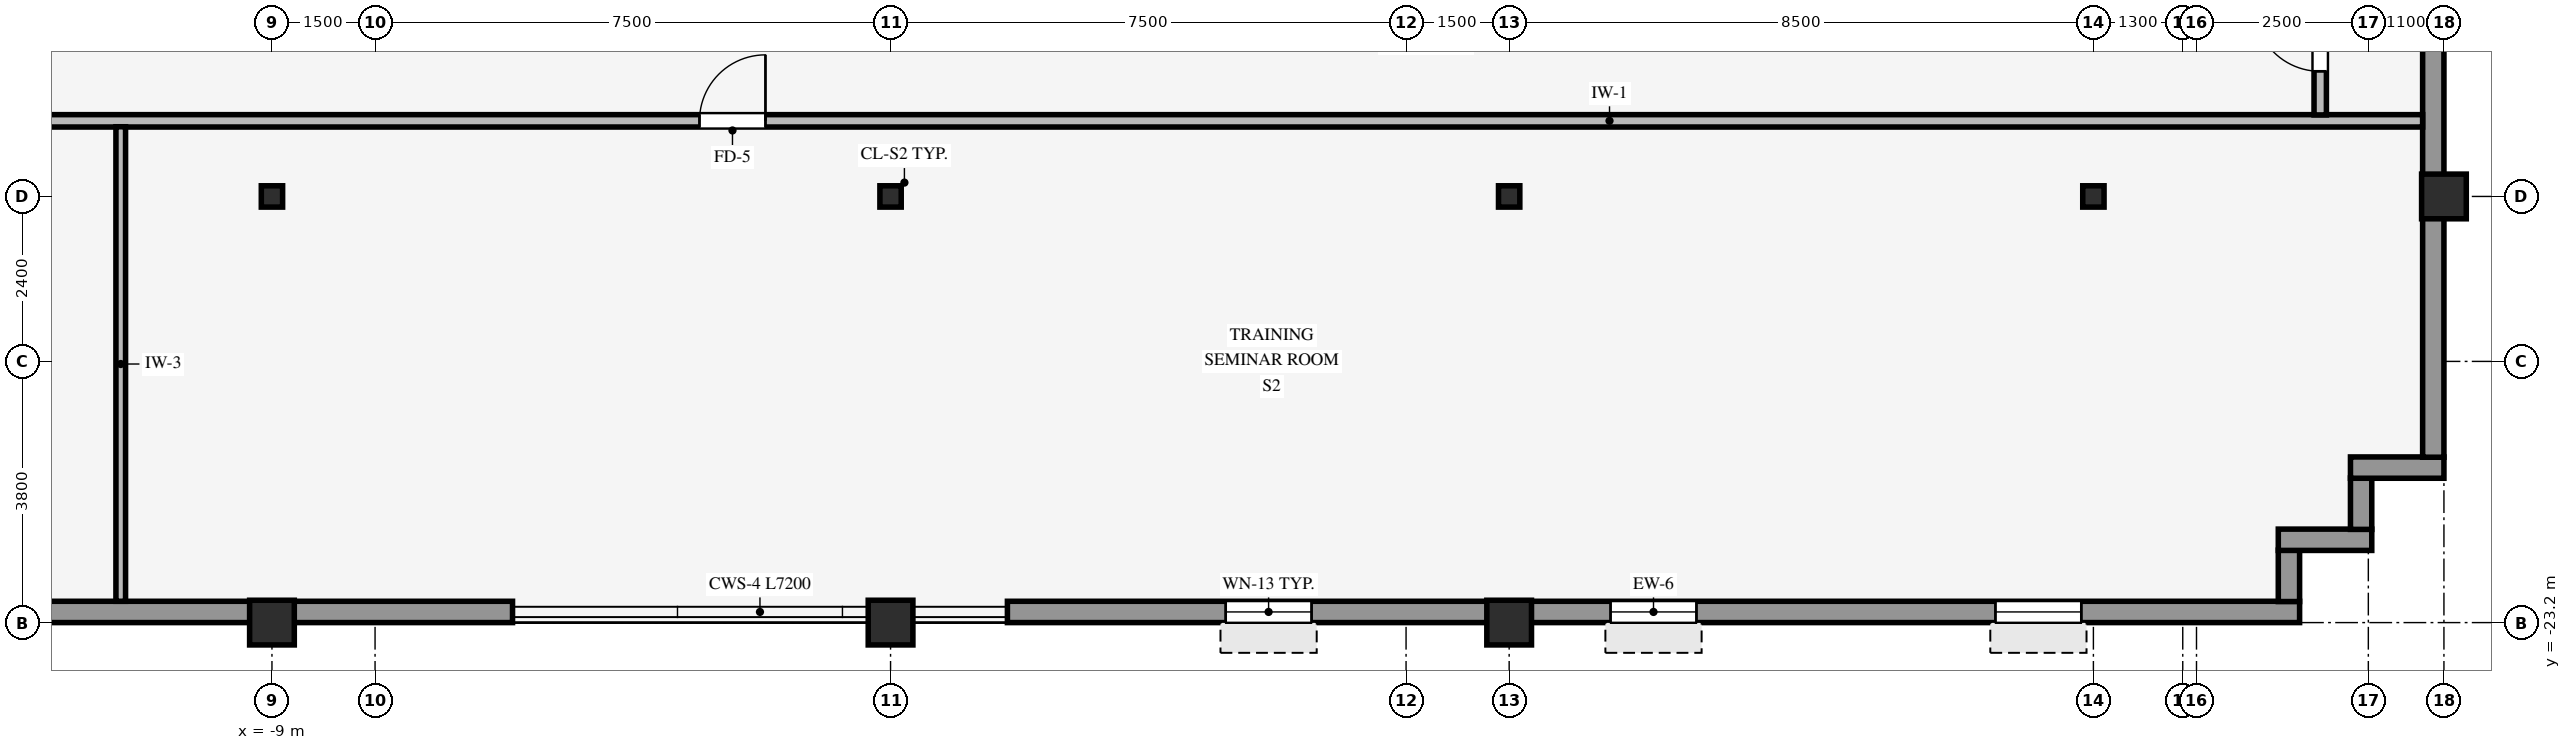
"""IFC4 building model, lengths in metres.
Left out: names, types, materials, properties, quantities, classifications, styles, units other than length and angle.
Written with IfcOpenShell. Run it as: python <this file> out.ifc"""

import sys

from ifc_helpers import new_model, si_unit, direction, frame, frame_2d, origin, origin_2d, place, context, subcontext, project, spatial, rectangle, hollow_rectangle, i_section, extrude, source, transform, mapped, element, fill, save


model = new_model("IFC4")
c1 = context("Model", 3, precision=1e-05, world=origin(), true_north=direction((0.0, 1.0)))
c2 = subcontext(c1, "Body", "Model", "MODEL_VIEW")
j1 = project(units=[si_unit("LENGTHUNIT", "METRE"), si_unit("PLANEANGLEUNIT", "RADIAN")], contexts=[c1])
p1 = place(None, origin())
s1 = spatial("IfcSite", under=j1, at=p1, CompositionType="ELEMENT")
p2 = place(p1, origin())
s2 = spatial("IfcBuilding", under=s1, at=p2, CompositionType="ELEMENT")
p3 = place(p2, frame((0.0, 0.0, 167.65)))
s3 = spatial("IfcBuildingStorey", under=s2, at=p3, CompositionType="ELEMENT", Elevation=167.65)
p4 = place(p3, frame((22.6, -17.0, -0.4), z_axis=(0.0, 0.0, 1.0), x_axis=(1.0, 0.0, 0.0)))
e1 = element("IfcColumn", 1, at=p4, inside=s3, PredefinedType="COLUMN", context=c2, shape_type="SweptSolid", body=[
    extrude(hollow_rectangle(XDim=0.65, YDim=0.65, WallThickness=0.04, InnerFilletRadius=0.04, OuterFilletRadius=0.08, at=origin_2d()), origin(), (0.0, 0.0, 1.0), 3.77),
])
for number, where, z_axis, x_axis in (
    (2, (-9.0, -23.2, 0.0), (0.0, 0.0, 1.0), (1.0, 0.0, 0.0)),
    (3, (0.0, -23.2, 0.0), (0.0, 0.0, 1.0), (1.0, 0.0, 0.0)),
    (4, (9.0, -23.2, 0.0), (0.0, 0.0, 1.0), (1.0, 0.0, 0.0)),
):
    element("IfcColumn", number, at=place(p3, frame(where, z_axis=z_axis, x_axis=x_axis)), inside=s3, PredefinedType="COLUMN", context=c2, shape_type="SweptSolid", body=[
        extrude(hollow_rectangle(XDim=0.65, YDim=0.65, WallThickness=0.04, InnerFilletRadius=0.04, OuterFilletRadius=0.08, at=origin_2d()), origin(), (0.0, 0.0, 1.0), 3.37),
    ])
for number, where, z_axis, x_axis in (
    (5, (0.0, -17.0, 0.0), (0.0, 0.0, 1.0), (1.0, 0.0, 0.0)),
    (6, (-9.0, -17.0, 0.0), (0.0, 0.0, 1.0), (1.0, 0.0, 0.0)),
    (7, (9.0, -17.0, 0.0), (0.0, 0.0, 1.0), (1.0, 0.0, 0.0)),
    (8, (17.5, -17.0, 0.0), (0.0, 0.0, 1.0), (1.0, 0.0, 0.0)),
):
    element("IfcColumn", number, at=place(p3, frame(where, z_axis=z_axis, x_axis=x_axis)), inside=s3, PredefinedType="COLUMN", context=c2, shape_type="SweptSolid", body=[
        extrude(i_section(OverallWidth=0.31, OverallDepth=0.31, WebThickness=0.015, FlangeThickness=0.015, FilletRadius=0.015, at=origin_2d()), origin(), (0.0, 0.0, 1.0), 3.37),
    ])
p5 = place(p3, frame((-24.3, -23.045, 0.0), z_axis=(0.0, 0.0, 1.0), x_axis=(1.0, 0.0, 0.0)))
e9 = element("IfcWall", 9, at=p5, inside=s3, PredefinedType="STANDARD", context=c2, shape_type="SweptSolid", body=[
    extrude(rectangle(XDim=18.8, YDim=0.31, at=frame_2d((9.4, 0.0))), origin(), (0.0, 0.0, 1.0), 2.705),
])
p6 = place(p5, frame((3.175, 0.0, 0.8)))
e10 = element("IfcOpeningElement", 10, at=p6, cuts=e9, PredefinedType="OPENING", context=c2, shape_type="SweptSolid", body=[
    extrude(rectangle(XDim=1.25, YDim=1.52, at=frame_2d((0.625, 0.76))), frame((0.0, 0.165, 0.0), z_axis=(0.0, -1.0, 0.0), x_axis=(1.0, 0.0, 0.0)), (0.0, 0.0, 1.0), 0.33),
])
p7 = place(p5, frame((8.775, 0.0, 0.8)))
e11 = element("IfcOpeningElement", 11, at=p7, cuts=e9, PredefinedType="OPENING", context=c2, shape_type="SweptSolid", body=[
    extrude(rectangle(XDim=1.25, YDim=1.52, at=frame_2d((0.625, 0.76))), frame((0.0, 0.165, 0.0), z_axis=(0.0, -1.0, 0.0), x_axis=(1.0, 0.0, 0.0)), (0.0, 0.0, 1.0), 0.33),
])
p8 = place(p3, frame((1.7, -23.045, 0.0), z_axis=(0.0, 0.0, 1.0), x_axis=(1.0, 0.0, 0.0)))
e12 = element("IfcWall", 12, at=p8, inside=s3, PredefinedType="STANDARD", context=c2, shape_type="SweptSolid", body=[
    extrude(rectangle(XDim=18.8, YDim=0.31, at=frame_2d((9.4, 0.0))), origin(), (0.0, 0.0, 1.0), 2.705),
])
p9 = place(p8, frame((3.175, 0.0, 0.8)))
e13 = element("IfcOpeningElement", 13, at=p9, cuts=e12, PredefinedType="OPENING", context=c2, shape_type="SweptSolid", body=[
    extrude(rectangle(XDim=1.25, YDim=1.52, at=frame_2d((0.625, 0.76))), frame((0.0, 0.165, 0.0), z_axis=(0.0, -1.0, 0.0), x_axis=(1.0, 0.0, 0.0)), (0.0, 0.0, 1.0), 0.33),
])
p10 = place(p8, frame((8.775, 0.0, 0.8)))
e14 = element("IfcOpeningElement", 14, at=p10, cuts=e12, PredefinedType="OPENING", context=c2, shape_type="SweptSolid", body=[
    extrude(rectangle(XDim=1.25, YDim=1.52, at=frame_2d((0.625, 0.76))), frame((0.0, 0.165, 0.0), z_axis=(0.0, -1.0, 0.0), x_axis=(1.0, 0.0, 0.0)), (0.0, 0.0, 1.0), 0.33),
])
p11 = place(p8, frame((14.375, 0.0, 0.8)))
e15 = element("IfcOpeningElement", 15, at=p11, cuts=e12, PredefinedType="OPENING", context=c2, shape_type="SweptSolid", body=[
    extrude(rectangle(XDim=1.25, YDim=1.52, at=frame_2d((0.625, 0.76))), frame((0.0, 0.165, 0.0), z_axis=(0.0, -1.0, 0.0), x_axis=(1.0, 0.0, 0.0)), (0.0, 0.0, 1.0), 0.33),
])
p12 = place(p3, frame((20.345, -22.894, 0.0), z_axis=(0.0, 0.0, 1.0), x_axis=(0.0, 1.0, 0.0)))
e16 = element("IfcWall", 16, at=p12, inside=s3, PredefinedType="STANDARD", context=c2, shape_type="SweptSolid", body=[
    extrude(rectangle(XDim=0.748, YDim=0.31, at=frame_2d((0.374, 0.0))), origin(), (0.0, 0.0, 1.0), 3.36),
])
p13 = place(p3, frame((20.19, -21.995, 0.0), z_axis=(0.0, 0.0, 1.0), x_axis=(1.0, 0.0, 0.0)))
e17 = element("IfcWall", 17, at=p13, inside=s3, PredefinedType="STANDARD", context=c2, shape_type="SweptSolid", body=[
    extrude(rectangle(XDim=1.36, YDim=0.31, at=frame_2d((0.68, 0.0))), origin(), (0.0, 0.0, 1.0), 3.36),
])
p14 = place(p3, frame((21.395, -21.844, 0.0), z_axis=(0.0, 0.0, 1.0), x_axis=(0.0, 1.0, 0.0)))
e18 = element("IfcWall", 18, at=p14, inside=s3, PredefinedType="STANDARD", context=c2, shape_type="SweptSolid", body=[
    extrude(rectangle(XDim=0.748, YDim=0.31, at=frame_2d((0.374, 0.0))), origin(), (0.0, 0.0, 1.0), 3.36),
])
p15 = place(p3, frame((21.24, -20.945, 0.0), z_axis=(0.0, 0.0, 1.0), x_axis=(1.0, 0.0, 0.0)))
e19 = element("IfcWall", 19, at=p15, inside=s3, PredefinedType="STANDARD", context=c2, shape_type="SweptSolid", body=[
    extrude(rectangle(XDim=1.36, YDim=0.31, at=frame_2d((0.68, 0.0))), origin(), (0.0, 0.0, 1.0), 3.36),
])
p16 = place(p3, frame((22.445, -20.794, 0.0), z_axis=(0.0, 0.0, 1.0), x_axis=(0.0, 1.0, 0.0)))
e20 = element("IfcWall", 20, at=p16, inside=s3, PredefinedType="STANDARD", context=c2, shape_type="SweptSolid", body=[
    extrude(rectangle(XDim=37.788, YDim=0.31, at=frame_2d((18.894, 0.0))), origin(), (0.0, 0.0, 1.0), 2.705),
])
p17 = place(p16, frame((16.444, 0.0, 0.0), z_axis=(0.0, 0.0, 1.0), x_axis=(-1.0, 0.0, 0.0)))
e21 = element("IfcOpeningElement", 21, at=p17, cuts=e20, PredefinedType="OPENING", context=c2, shape_type="SweptSolid", body=[
    extrude(rectangle(XDim=1.05, YDim=2.1, at=frame_2d((0.525, 1.05))), frame((0.0, 0.165, 0.0), z_axis=(0.0, -1.0, 0.0), x_axis=(1.0, 0.0, 0.0)), (0.0, 0.0, 1.0), 0.33),
])
p18 = place(p16, frame((7.644, 0.0, 0.8)))
e22 = element("IfcOpeningElement", 22, at=p18, cuts=e20, PredefinedType="OPENING", context=c2, shape_type="SweptSolid", body=[
    extrude(rectangle(XDim=2.05, YDim=1.52, at=frame_2d((1.025, 0.76))), frame((0.0, 0.165, 0.0), z_axis=(0.0, -1.0, 0.0), x_axis=(1.0, 0.0, 0.0)), (0.0, 0.0, 1.0), 0.33),
])
p19 = place(p16, frame((12.756, 0.0, 0.8)))
e23 = element("IfcOpeningElement", 23, at=p19, cuts=e20, PredefinedType="OPENING", context=c2, shape_type="SweptSolid", body=[
    extrude(rectangle(XDim=2.05, YDim=1.52, at=frame_2d((1.025, 0.76))), frame((0.0, 0.165, 0.0), z_axis=(0.0, -1.0, 0.0), x_axis=(1.0, 0.0, 0.0)), (0.0, 0.0, 1.0), 0.33),
])
p20 = place(p16, frame((17.869, 0.0, 0.8)))
e24 = element("IfcOpeningElement", 24, at=p20, cuts=e20, PredefinedType="OPENING", context=c2, shape_type="SweptSolid", body=[
    extrude(rectangle(XDim=2.05, YDim=1.52, at=frame_2d((1.025, 0.76))), frame((0.0, 0.165, 0.0), z_axis=(0.0, -1.0, 0.0), x_axis=(1.0, 0.0, 0.0)), (0.0, 0.0, 1.0), 0.33),
])
p21 = place(p16, frame((22.982, 0.0, 0.8)))
e25 = element("IfcOpeningElement", 25, at=p21, cuts=e20, PredefinedType="OPENING", context=c2, shape_type="SweptSolid", body=[
    extrude(rectangle(XDim=2.05, YDim=1.52, at=frame_2d((1.025, 0.76))), frame((0.0, 0.165, 0.0), z_axis=(0.0, -1.0, 0.0), x_axis=(1.0, 0.0, 0.0)), (0.0, 0.0, 1.0), 0.33),
])
p22 = place(p16, frame((27.194, 0.0, 0.8)))
e26 = element("IfcOpeningElement", 26, at=p22, cuts=e20, PredefinedType="OPENING", context=c2, shape_type="SweptSolid", body=[
    extrude(rectangle(XDim=2.05, YDim=1.52, at=frame_2d((1.025, 0.76))), frame((0.0, 0.165, 0.0), z_axis=(0.0, -1.0, 0.0), x_axis=(1.0, 0.0, 0.0)), (0.0, 0.0, 1.0), 0.33),
])
p23 = place(p16, frame((33.207, 0.0, 0.8)))
e27 = element("IfcOpeningElement", 27, at=p23, cuts=e20, PredefinedType="OPENING", context=c2, shape_type="SweptSolid", body=[
    extrude(rectangle(XDim=2.05, YDim=1.52, at=frame_2d((1.025, 0.76))), frame((0.0, 0.165, 0.0), z_axis=(0.0, -1.0, 0.0), x_axis=(1.0, 0.0, 0.0)), (0.0, 0.0, 1.0), 0.33),
])
p24 = place(p3, frame((-26.09, -15.9, 0.0), z_axis=(0.0, 0.0, 1.0), x_axis=(1.0, 0.0, 0.0)))
e28 = element("IfcWall", 28, at=p24, inside=s3, PredefinedType="PARTITIONING", context=c2, shape_type="SweptSolid", body=[
    extrude(rectangle(XDim=48.38, YDim=0.18, at=frame_2d((24.19, 0.0))), origin(), (0.0, 0.0, 1.0), 3.36),
])
p25 = place(p24, frame((23.31, 0.0, 0.0)))
e29 = element("IfcOpeningElement", 29, at=p25, cuts=e28, PredefinedType="OPENING", context=c2, shape_type="SweptSolid", body=[
    extrude(rectangle(XDim=0.96, YDim=2.1, at=frame_2d((0.48, 1.05))), frame((0.0, 0.1, 0.0), z_axis=(0.0, -1.0, 0.0), x_axis=(1.0, 0.0, 0.0)), (0.0, 0.0, 1.0), 0.2),
])
p26 = place(p24, frame((11.16, 0.0, 0.0)))
e30 = element("IfcOpeningElement", 30, at=p26, cuts=e28, PredefinedType="OPENING", context=c2, shape_type="SweptSolid", body=[
    extrude(rectangle(XDim=0.96, YDim=2.1, at=frame_2d((0.48, 1.05))), frame((0.0, 0.1, 0.0), z_axis=(0.0, -1.0, 0.0), x_axis=(1.0, 0.0, 0.0)), (0.0, 0.0, 1.0), 0.2),
])
p27 = place(p3, frame((-11.2, -22.89, 0.0), z_axis=(0.0, 0.0, 1.0), x_axis=(0.0, 1.0, 0.0)))
e31 = element("IfcWall", 31, at=p27, inside=s3, PredefinedType="PARTITIONING", context=c2, shape_type="SweptSolid", body=[
    extrude(rectangle(XDim=6.904, YDim=0.14, at=frame_2d((3.452, 0.0))), origin(), (0.0, 0.0, 1.0), 3.36),
])
p28 = place(p3, frame((20.8, -15.814, 0.0), z_axis=(0.0, 0.0, 1.0), x_axis=(0.0, 1.0, 0.0)))
e32 = element("IfcWall", 32, at=p28, inside=s3, PredefinedType="PARTITIONING", context=c2, shape_type="SweptSolid", body=[
    extrude(rectangle(XDim=2.228, YDim=0.18, at=frame_2d((1.114, 0.0))), origin(), (0.0, 0.0, 1.0), 3.36),
])
p29 = place(p28, frame((0.634, 0.0, 0.0)))
e33 = element("IfcOpeningElement", 33, at=p29, cuts=e32, PredefinedType="OPENING", context=c2, shape_type="SweptSolid", body=[
    extrude(rectangle(XDim=0.96, YDim=2.1, at=frame_2d((0.48, 1.05))), frame((0.0, 0.1, 0.0), z_axis=(0.0, -1.0, 0.0), x_axis=(1.0, 0.0, 0.0)), (0.0, 0.0, 1.0), 0.2),
])
m1 = source(origin(), c2, "Body", "SweptSolid", [
    extrude(rectangle(XDim=1.25, YDim=1.52, at=frame_2d((0.625, 0.76))), frame((0.0, 0.03, 0.0), z_axis=(0.0, -1.0, 0.0), x_axis=(1.0, 0.0, 0.0)), (0.0, 0.0, 1.0), 0.06),
])
p30 = place(p9, origin())
e34 = element("IfcWindow", 34, at=p30, inside=s3, PartitioningType="SINGLE_PANEL", PredefinedType="WINDOW", context=c2, shape_type="MappedRepresentation", body=[
    mapped(m1, transform((0.0, 0.0, 0.0), scale=1.0)),
])
fill(e13, e34)
p31 = place(p10, origin())
e35 = element("IfcWindow", 35, at=p31, inside=s3, PartitioningType="SINGLE_PANEL", PredefinedType="WINDOW", context=c2, shape_type="MappedRepresentation", body=[
    mapped(m1, transform((0.0, 0.0, 0.0), scale=1.0)),
])
fill(e14, e35)
p32 = place(p11, origin())
e36 = element("IfcWindow", 36, at=p32, inside=s3, PartitioningType="SINGLE_PANEL", PredefinedType="WINDOW", context=c2, shape_type="MappedRepresentation", body=[
    mapped(m1, transform((0.0, 0.0, 0.0), scale=1.0)),
])
fill(e15, e36)
m2 = source(origin(), c2, "Body", "SweptSolid", [
    extrude(rectangle(XDim=0.96, YDim=2.1, at=frame_2d((0.48, 1.05))), frame((0.0, 0.025, 0.0), z_axis=(0.0, -1.0, 0.0), x_axis=(1.0, 0.0, 0.0)), (0.0, 0.0, 1.0), 0.05),
])
p33 = place(p25, origin())
e37 = element("IfcDoor", 37, at=p33, inside=s3, OperationType="SINGLE_SWING_RIGHT", PredefinedType="DOOR", context=c2, shape_type="MappedRepresentation", body=[
    mapped(m2, transform((0.0, 0.0, 0.0), scale=1.0)),
])
fill(e29, e37)
p34 = place(p29, origin())
e38 = element("IfcDoor", 38, at=p34, inside=s3, OperationType="SINGLE_SWING_RIGHT", PredefinedType="DOOR", context=c2, shape_type="MappedRepresentation", body=[
    mapped(m2, transform((0.0, 0.0, 0.0), scale=1.0)),
])
fill(e33, e38)
save(model, sys.argv[1])
